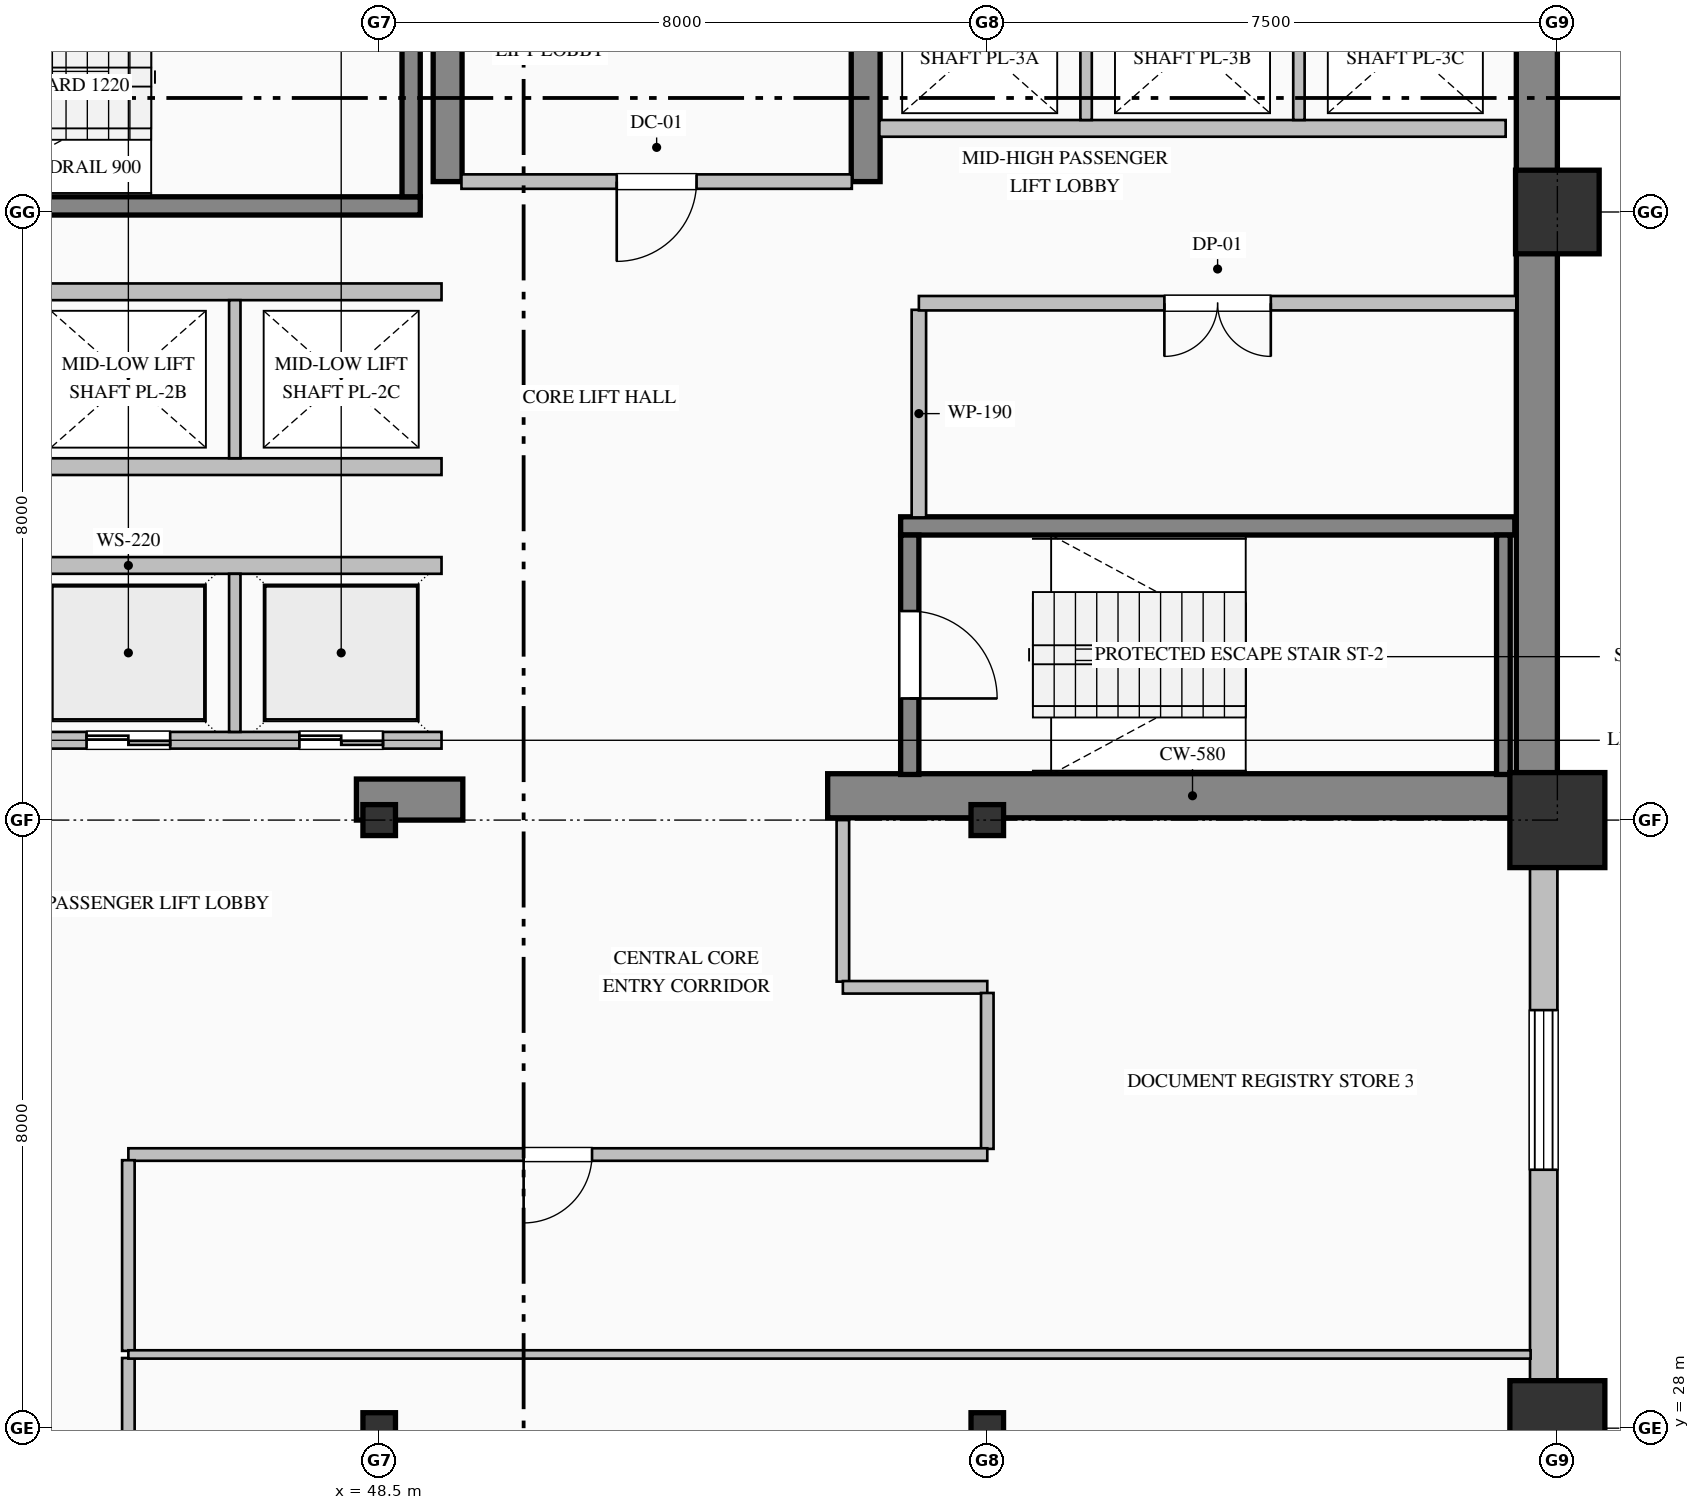
"""IFC4 building model, lengths in metres.
Left out: names, types, materials, properties, quantities, classifications, styles, units other than length and angle.
Written with IfcOpenShell. Run it as: python <this file> out.ifc"""

import sys

from ifc_helpers import new_model, si_unit, direction, frame, frame_2d, origin, origin_2d, place, context, subcontext, project, spatial, rectangle, hollow_rectangle, i_section, extrude, element, fill, save


model = new_model("IFC4")
c1 = context("Model", 3, precision=1e-05, world=origin(), true_north=direction((0.0, 1.0)))
c2 = subcontext(c1, "Body", "Model", "MODEL_VIEW")
j1 = project(units=[si_unit("LENGTHUNIT", "METRE"), si_unit("PLANEANGLEUNIT", "RADIAN")], contexts=[c1])
p1 = place(None, origin())
s1 = spatial("IfcSite", under=j1, at=p1, CompositionType="ELEMENT")
p2 = place(p1, origin())
s2 = spatial("IfcBuilding", under=s1, at=p2, CompositionType="ELEMENT")
p3 = place(p2, frame((0.0, 0.0, 104.2)))
s3 = spatial("IfcBuildingStorey", under=s2, at=p3, CompositionType="ELEMENT", Elevation=104.2)
p4 = place(p3, frame((63.73, 36.32, 0.0), z_axis=(0.0, 0.0, 1.0), x_axis=(0.0, 1.0, 0.0)))
e1 = element("IfcWall", 1, at=p4, inside=s3, PredefinedType="SHEAR", context=c2, shape_type="SweptSolid", body=[
    extrude(rectangle(XDim=15.14, YDim=0.54, at=frame_2d((7.57, 0.0))), origin(), (0.0, 0.0, 1.0), 3.65),
])
p5 = place(p3, frame((48.2, 36.27, 0.0), z_axis=(0.0, 0.0, 1.0), x_axis=(1.0, 0.0, 0.0)))
e2 = element("IfcWall", 2, at=p5, inside=s3, PredefinedType="SHEAR", context=c2, shape_type="SweptSolid", body=[
    extrude(rectangle(XDim=1.4, YDim=0.54, at=frame_2d((0.7, 0.0))), origin(), (0.0, 0.0, 1.0), 3.65),
])
p6 = place(p3, frame((54.4, 36.32, 0.0), z_axis=(0.0, 0.0, 1.0), x_axis=(1.0, 0.0, 0.0)))
e3 = element("IfcWall", 3, at=p6, inside=s3, PredefinedType="SHEAR", context=c2, shape_type="SweptSolid", body=[
    extrude(rectangle(XDim=9.6, YDim=0.58, at=frame_2d((4.8, 0.0))), origin(), (0.0, 0.0, 1.0), 4.0),
])
p7 = place(p3, frame((49.4, 44.4, 0.0), z_axis=(0.0, 0.0, 1.0), x_axis=(0.0, 1.0, 0.0)))
e4 = element("IfcWall", 4, at=p7, inside=s3, PredefinedType="SHEAR", context=c2, shape_type="SweptSolid", body=[
    extrude(rectangle(XDim=3.0, YDim=0.38, at=frame_2d((1.5, 0.0))), origin(), (0.0, 0.0, 1.0), 3.65),
])
p8 = place(p3, frame((54.9, 44.4, 0.0), z_axis=(0.0, 0.0, 1.0), x_axis=(0.0, 1.0, 0.0)))
e5 = element("IfcWall", 5, at=p8, inside=s3, PredefinedType="SHEAR", context=c2, shape_type="SweptSolid", body=[
    extrude(rectangle(XDim=7.06, YDim=0.38, at=frame_2d((3.53, 0.0))), origin(), (0.0, 0.0, 1.0), 3.65),
])
for number, where, z_axis, x_axis in (
    (6, (48.5, 28.0, 0.0), (0.0, 0.0, 1.0), (1.0, 0.0, 0.0)),
    (7, (48.5, 36.0, 0.0), (0.0, 0.0, 1.0), (1.0, 0.0, 0.0)),
    (8, (56.5, 28.0, 0.0), (0.0, 0.0, 1.0), (1.0, 0.0, 0.0)),
    (9, (56.5, 36.0, 0.0), (0.0, 0.0, 1.0), (1.0, 0.0, 0.0)),
):
    element("IfcColumn", number, at=place(p3, frame(where, z_axis=z_axis, x_axis=x_axis)), inside=s3, PredefinedType="COLUMN", context=c2, shape_type="SweptSolid", body=[
        extrude(i_section(OverallWidth=0.407, OverallDepth=0.428, WebThickness=0.02, FlangeThickness=0.035, FilletRadius=0.022, at=origin_2d()), origin(), (0.0, 0.0, 1.0), 4.0),
    ])
for number, where, z_axis, x_axis in (
    (10, (64.0, 28.0, 0.0), (0.0, 0.0, 1.0), (1.0, 0.0, 0.0)),
    (11, (64.0, 36.0, 0.0), (0.0, 0.0, 1.0), (1.0, 0.0, 0.0)),
):
    element("IfcColumn", number, at=place(p3, frame(where, z_axis=z_axis, x_axis=x_axis)), inside=s3, PredefinedType="COLUMN", context=c2, shape_type="SweptSolid", body=[
        extrude(hollow_rectangle(XDim=1.25, YDim=1.25, WallThickness=0.045, at=origin_2d()), origin(), (0.0, 0.0, 1.0), 4.0),
    ])
p9 = place(p3, frame((64.0, 44.0, 0.0), z_axis=(0.0, 0.0, 1.0), x_axis=(1.0, 0.0, 0.0)))
e12 = element("IfcColumn", 12, at=p9, inside=s3, PredefinedType="COLUMN", context=c2, shape_type="SweptSolid", body=[
    extrude(hollow_rectangle(XDim=1.1, YDim=1.1, WallThickness=0.04, at=origin_2d()), origin(), (0.0, 0.0, 1.0), 4.0),
])
p10 = place(p3, frame((63.82, 36.05, 0.0), z_axis=(0.0, 0.0, 1.0), x_axis=(0.0, -1.0, 0.0)))
e13 = element("IfcWall", 13, at=p10, inside=s3, PredefinedType="SOLIDWALL", context=c2, shape_type="SweptSolid", body=[
    extrude(rectangle(XDim=28.05, YDim=0.36, at=frame_2d((14.025, 0.0))), origin(), (0.0, 0.0, 1.0), 3.15),
])
p11 = place(p10, frame((2.55, 0.0, 0.85)))
e14 = element("IfcOpeningElement", 14, at=p11, cuts=e13, PredefinedType="OPENING", context=c2, shape_type="SweptSolid", body=[
    extrude(rectangle(XDim=2.1, YDim=2.05, at=frame_2d((1.05, 1.025))), frame((0.0, 0.19, 0.0), z_axis=(0.0, -1.0, 0.0), x_axis=(1.0, 0.0, 0.0)), (0.0, 0.0, 1.0), 0.38),
])
p12 = place(p10, frame((9.9, 0.0, 0.85)))
e15 = element("IfcOpeningElement", 15, at=p12, cuts=e13, PredefinedType="OPENING", context=c2, shape_type="SweptSolid", body=[
    extrude(rectangle(XDim=1.8, YDim=2.05, at=frame_2d((0.9, 1.025))), frame((0.0, 0.19, 0.0), z_axis=(0.0, -1.0, 0.0), x_axis=(1.0, 0.0, 0.0)), (0.0, 0.0, 1.0), 0.38),
])
p13 = place(p3, frame((49.04, 44.08, 0.0), z_axis=(0.0, 0.0, 1.0), x_axis=(-1.0, 0.0, 0.0)))
e16 = element("IfcWall", 16, at=p13, inside=s3, PredefinedType="SOLIDWALL", context=c2, shape_type="SweptSolid", body=[
    extrude(rectangle(XDim=8.08, YDim=0.24, at=frame_2d((4.04, 0.0))), origin(), (0.0, 0.0, 1.0), 4.0),
])
p14 = place(p3, frame((48.92, 44.2, 0.0), z_axis=(0.0, 0.0, 1.0), x_axis=(0.0, 1.0, 0.0)))
e17 = element("IfcWall", 17, at=p14, inside=s3, PredefinedType="SOLIDWALL", context=c2, shape_type="SweptSolid", body=[
    extrude(rectangle(XDim=3.15, YDim=0.24, at=frame_2d((1.575, 0.0))), origin(), (0.0, 0.0, 1.0), 4.0),
])
p15 = place(p3, frame((55.36, 39.87, 0.0), z_axis=(0.0, 0.0, 1.0), x_axis=(1.0, 0.0, 0.0)))
e18 = element("IfcWall", 18, at=p15, inside=s3, PredefinedType="SOLIDWALL", context=c2, shape_type="SweptSolid", body=[
    extrude(rectangle(XDim=8.08, YDim=0.24, at=frame_2d((4.04, 0.0))), origin(), (0.0, 0.0, 1.0), 4.0),
])
p16 = place(p3, frame((55.48, 39.75, 0.0), z_axis=(0.0, 0.0, 1.0), x_axis=(0.0, -1.0, 0.0)))
e19 = element("IfcWall", 19, at=p16, inside=s3, PredefinedType="SOLIDWALL", context=c2, shape_type="SweptSolid", body=[
    extrude(rectangle(XDim=3.15, YDim=0.24, at=frame_2d((1.575, 0.0))), origin(), (0.0, 0.0, 1.0), 4.0),
])
p17 = place(p16, frame((1.0, 0.0, 0.0)))
e20 = element("IfcOpeningElement", 20, at=p17, cuts=e19, PredefinedType="OPENING", context=c2, shape_type="SweptSolid", body=[
    extrude(rectangle(XDim=1.15, YDim=2.2, at=frame_2d((0.575, 1.1))), frame((0.0, 0.13, 0.0), z_axis=(0.0, -1.0, 0.0), x_axis=(1.0, 0.0, 0.0)), (0.0, 0.0, 1.0), 0.26),
])
p18 = place(p3, frame((63.29, 36.6, 0.0), z_axis=(0.0, 0.0, 1.0), x_axis=(0.0, 1.0, 0.0)))
e21 = element("IfcWall", 21, at=p18, inside=s3, PredefinedType="SOLIDWALL", context=c2, shape_type="SweptSolid", body=[
    extrude(rectangle(XDim=3.15, YDim=0.18, at=frame_2d((1.575, 0.0))), origin(), (0.0, 0.0, 1.0), 4.0),
])
p19 = place(p3, frame((49.32, 37.05, 0.0), z_axis=(0.0, 0.0, 1.0), x_axis=(-1.0, 0.0, 0.0)))
e22 = element("IfcWall", 22, at=p19, inside=s3, PredefinedType="PARTITIONING", context=c2, shape_type="SweptSolid", body=[
    extrude(rectangle(XDim=8.24, YDim=0.22, at=frame_2d((4.12, 0.0))), origin(), (0.0, 0.0, 1.0), 3.65),
])
p20 = place(p19, frame((6.37, 0.0, 0.0)))
e23 = element("IfcOpeningElement", 23, at=p20, cuts=e22, PredefinedType="OPENING", context=c2, shape_type="SweptSolid", body=[
    extrude(rectangle(XDim=1.1, YDim=2.2, at=frame_2d((0.55, 1.1))), frame((0.0, 0.12, 0.0), z_axis=(0.0, -1.0, 0.0), x_axis=(1.0, 0.0, 0.0)), (0.0, 0.0, 1.0), 0.24),
])
p21 = place(p19, frame((3.57, 0.0, 0.0)))
e24 = element("IfcOpeningElement", 24, at=p21, cuts=e22, PredefinedType="OPENING", context=c2, shape_type="SweptSolid", body=[
    extrude(rectangle(XDim=1.1, YDim=2.2, at=frame_2d((0.55, 1.1))), frame((0.0, 0.12, 0.0), z_axis=(0.0, -1.0, 0.0), x_axis=(1.0, 0.0, 0.0)), (0.0, 0.0, 1.0), 0.24),
])
p22 = place(p19, frame((0.77, 0.0, 0.0)))
e25 = element("IfcOpeningElement", 25, at=p22, cuts=e22, PredefinedType="OPENING", context=c2, shape_type="SweptSolid", body=[
    extrude(rectangle(XDim=1.1, YDim=2.2, at=frame_2d((0.55, 1.1))), frame((0.0, 0.12, 0.0), z_axis=(0.0, -1.0, 0.0), x_axis=(1.0, 0.0, 0.0)), (0.0, 0.0, 1.0), 0.24),
])
p23 = place(p3, frame((41.08, 39.35, 0.0), z_axis=(0.0, 0.0, 1.0), x_axis=(1.0, 0.0, 0.0)))
e26 = element("IfcWall", 26, at=p23, inside=s3, PredefinedType="PARTITIONING", context=c2, shape_type="SweptSolid", body=[
    extrude(rectangle(XDim=8.24, YDim=0.22, at=frame_2d((4.12, 0.0))), origin(), (0.0, 0.0, 1.0), 3.65),
])
p24 = place(p3, frame((46.6, 37.16, 0.0), z_axis=(0.0, 0.0, 1.0), x_axis=(0.0, 1.0, 0.0)))
e27 = element("IfcWall", 27, at=p24, inside=s3, PredefinedType="PARTITIONING", context=c2, shape_type="SweptSolid", body=[
    extrude(rectangle(XDim=2.08, YDim=0.15, at=frame_2d((1.04, 0.0))), origin(), (0.0, 0.0, 1.0), 3.65),
])
for number, where, z_axis, x_axis in (
    (28, (49.32, 40.65, 0.0), (0.0, 0.0, 1.0), (-1.0, 0.0, 0.0)),
    (29, (41.08, 42.95, 0.0), (0.0, 0.0, 1.0), (1.0, 0.0, 0.0)),
):
    element("IfcWall", number, at=place(p3, frame(where, z_axis=z_axis, x_axis=x_axis)), inside=s3, PredefinedType="PARTITIONING", context=c2, shape_type="SweptSolid", body=[
        extrude(rectangle(XDim=8.24, YDim=0.22, at=frame_2d((4.12, 0.0))), origin(), (0.0, 0.0, 1.0), 3.65),
    ])
p25 = place(p3, frame((46.6, 40.76, 0.0), z_axis=(0.0, 0.0, 1.0), x_axis=(0.0, 1.0, 0.0)))
e30 = element("IfcWall", 30, at=p25, inside=s3, PredefinedType="PARTITIONING", context=c2, shape_type="SweptSolid", body=[
    extrude(rectangle(XDim=2.08, YDim=0.15, at=frame_2d((1.04, 0.0))), origin(), (0.0, 0.0, 1.0), 3.65),
])
p26 = place(p3, frame((63.32, 45.1, 0.0), z_axis=(0.0, 0.0, 1.0), x_axis=(-1.0, 0.0, 0.0)))
e31 = element("IfcWall", 31, at=p26, inside=s3, PredefinedType="PARTITIONING", context=c2, shape_type="SweptSolid", body=[
    extrude(rectangle(XDim=8.24, YDim=0.22, at=frame_2d((4.12, 0.0))), origin(), (0.0, 0.0, 1.0), 3.65),
])
for number, where, z_axis, x_axis in (
    (32, (57.8, 45.21, 0.0), (0.0, 0.0, 1.0), (0.0, 1.0, 0.0)),
    (33, (60.6, 45.21, 0.0), (0.0, 0.0, 1.0), (0.0, 1.0, 0.0)),
):
    element("IfcWall", number, at=place(p3, frame(where, z_axis=z_axis, x_axis=x_axis)), inside=s3, PredefinedType="PARTITIONING", context=c2, shape_type="SweptSolid", body=[
        extrude(rectangle(XDim=2.03, YDim=0.15, at=frame_2d((1.015, 0.0))), origin(), (0.0, 0.0, 1.0), 3.65),
    ])
p27 = place(p3, frame((54.718, 44.4, 0.0), z_axis=(0.0, 0.0, 1.0), x_axis=(-1.0, 0.0, 0.0)))
e34 = element("IfcWall", 34, at=p27, inside=s3, PredefinedType="PARTITIONING", context=c2, shape_type="SweptSolid", body=[
    extrude(rectangle(XDim=5.136, YDim=0.19, at=frame_2d((2.568, 0.0))), origin(), (0.0, 0.0, 1.0), 3.65),
])
p28 = place(p27, frame((2.043, 0.0, 0.0)))
e35 = element("IfcOpeningElement", 35, at=p28, cuts=e34, PredefinedType="OPENING", context=c2, shape_type="SweptSolid", body=[
    extrude(rectangle(XDim=1.05, YDim=2.15, at=frame_2d((0.525, 1.075))), frame((0.0, 0.105, 0.0), z_axis=(0.0, -1.0, 0.0), x_axis=(1.0, 0.0, 0.0)), (0.0, 0.0, 1.0), 0.21),
])
p29 = place(p3, frame((55.6, 42.713, 0.0), z_axis=(0.0, 0.0, 1.0), x_axis=(0.0, -1.0, 0.0)))
e36 = element("IfcWall", 36, at=p29, inside=s3, PredefinedType="PARTITIONING", context=c2, shape_type="SweptSolid", body=[
    extrude(rectangle(XDim=2.731, YDim=0.19, at=frame_2d((1.365, 0.0))), origin(), (0.0, 0.0, 1.0), 3.65),
])
p30 = place(p3, frame((63.46, 42.8, 0.0), z_axis=(0.0, 0.0, 1.0), x_axis=(-1.0, 0.0, 0.0)))
e37 = element("IfcWall", 37, at=p30, inside=s3, PredefinedType="PARTITIONING", context=c2, shape_type="SweptSolid", body=[
    extrude(rectangle(XDim=7.86, YDim=0.19, at=frame_2d((3.93, 0.0))), origin(), (0.0, 0.0, 1.0), 3.65),
])
p31 = place(p30, frame((3.23, 0.0, 0.0)))
e38 = element("IfcOpeningElement", 38, at=p31, cuts=e37, PredefinedType="OPENING", context=c2, shape_type="SweptSolid", body=[
    extrude(rectangle(XDim=1.4, YDim=2.25, at=frame_2d((0.7, 1.125))), frame((0.0, 0.105, 0.0), z_axis=(0.0, -1.0, 0.0), x_axis=(1.0, 0.0, 0.0)), (0.0, 0.0, 1.0), 0.21),
])
p32 = place(p3, frame((54.6, 36.0, 0.0), z_axis=(0.0, 0.0, 1.0), x_axis=(0.0, -1.0, 0.0)))
e39 = element("IfcWall", 39, at=p32, inside=s3, PredefinedType="PARTITIONING", context=c2, shape_type="SweptSolid", body=[
    extrude(rectangle(XDim=2.125, YDim=0.165, at=frame_2d((1.063, 0.0))), origin(), (0.0, 0.0, 1.0), 3.65),
])
p33 = place(p3, frame((54.6, 33.8, 0.0), z_axis=(0.0, 0.0, 1.0), x_axis=(1.0, 0.0, 0.0)))
e40 = element("IfcWall", 40, at=p33, inside=s3, PredefinedType="PARTITIONING", context=c2, shape_type="SweptSolid", body=[
    extrude(rectangle(XDim=1.9, YDim=0.165, at=frame_2d((0.95, 0.0))), origin(), (0.0, 0.0, 1.0), 3.65),
])
p34 = place(p3, frame((56.5, 33.726, 0.0), z_axis=(0.0, 0.0, 1.0), x_axis=(0.0, -1.0, 0.0)))
e41 = element("IfcWall", 41, at=p34, inside=s3, PredefinedType="PARTITIONING", context=c2, shape_type="SweptSolid", body=[
    extrude(rectangle(XDim=2.051, YDim=0.165, at=frame_2d((1.025, 0.0))), origin(), (0.0, 0.0, 1.0), 2.942),
])
p35 = place(p3, frame((56.5, 31.6, 0.0), z_axis=(0.0, 0.0, 1.0), x_axis=(-1.0, 0.0, 0.0)))
e42 = element("IfcWall", 42, at=p35, inside=s3, PredefinedType="PARTITIONING", context=c2, shape_type="SweptSolid", body=[
    extrude(rectangle(XDim=11.3, YDim=0.165, at=frame_2d((5.65, 0.0))), origin(), (0.0, 0.0, 1.0), 3.65),
])
p36 = place(p35, frame((5.2, 0.0, 0.0)))
e43 = element("IfcOpeningElement", 43, at=p36, cuts=e42, PredefinedType="OPENING", context=c2, shape_type="SweptSolid", body=[
    extrude(rectangle(XDim=0.9, YDim=2.15, at=frame_2d((0.45, 1.075))), frame((0.0, 0.093, 0.0), z_axis=(0.0, -1.0, 0.0), x_axis=(1.0, 0.0, 0.0)), (0.0, 0.0, 1.0), 0.185),
])
p37 = place(p3, frame((45.2, 28.923, 0.0), z_axis=(0.0, 0.0, 1.0), x_axis=(0.0, -1.0, 0.0)))
e44 = element("IfcWall", 44, at=p37, inside=s3, PredefinedType="PARTITIONING", context=c2, shape_type="SweptSolid", body=[
    extrude(rectangle(XDim=6.936, YDim=0.165, at=frame_2d((3.468, 0.0))), origin(), (0.0, 0.0, 1.0), 3.65),
])
p38 = place(p37, frame((3.018, 0.0, 0.0)))
e45 = element("IfcOpeningElement", 45, at=p38, cuts=e44, PredefinedType="OPENING", context=c2, shape_type="SweptSolid", body=[
    extrude(rectangle(XDim=0.9, YDim=2.15, at=frame_2d((0.45, 1.075))), frame((0.0, 0.093, 0.0), z_axis=(0.0, -1.0, 0.0), x_axis=(1.0, 0.0, 0.0)), (0.0, 0.0, 1.0), 0.185),
])
p39 = place(p3, frame((45.2, 31.525, 0.0), z_axis=(0.0, 0.0, 1.0), x_axis=(0.0, -1.0, 0.0)))
e46 = element("IfcWall", 46, at=p39, inside=s3, PredefinedType="PARTITIONING", context=c2, shape_type="SweptSolid", body=[
    extrude(rectangle(XDim=2.508, YDim=0.165, at=frame_2d((1.254, 0.0))), origin(), (0.0, 0.0, 1.0), 3.65),
])
p40 = place(p3, frame((45.2, 28.97, 0.0), z_axis=(0.0, 0.0, 1.0), x_axis=(1.0, 0.0, 0.0)))
e47 = element("IfcWall", 47, at=p40, inside=s3, PredefinedType="MOVABLE", context=c2, shape_type="SweptSolid", body=[
    extrude(rectangle(XDim=18.448, YDim=0.11, at=frame_2d((9.224, 0.0))), origin(), (0.0, 0.0, 1.0), 3.65),
])
p41 = place(p11, origin())
e48 = element("IfcWindow", 48, at=p41, inside=s3, PartitioningType="TRIPLE_PANEL_VERTICAL", PredefinedType="WINDOW", context=c2, shape_type="SweptSolid", body=[
    extrude(rectangle(XDim=2.1, YDim=2.05, at=frame_2d((1.05, 1.025))), frame((0.0, 0.15, 0.0), z_axis=(0.0, -1.0, 0.0), x_axis=(1.0, 0.0, 0.0)), (0.0, 0.0, 1.0), 0.06),
])
fill(e14, e48)
p42 = place(p17, origin())
e49 = element("IfcDoor", 49, at=p42, inside=s3, OperationType="SINGLE_SWING_RIGHT", PredefinedType="DOOR", context=c2, shape_type="SweptSolid", body=[
    extrude(rectangle(XDim=1.15, YDim=2.2, at=frame_2d((0.575, 1.1))), frame((0.0, 0.025, 0.0), z_axis=(0.0, -1.0, 0.0), x_axis=(1.0, 0.0, 0.0)), (0.0, 0.0, 1.0), 0.05),
])
fill(e20, e49)
p43 = place(p21, origin())
e50 = element("IfcDoor", 50, at=p43, inside=s3, OperationType="DOUBLE_DOOR_SLIDING", PredefinedType="DOOR", context=c2, shape_type="SweptSolid", body=[
    extrude(rectangle(XDim=1.1, YDim=2.2, at=frame_2d((0.55, 1.1))), frame((0.0, 0.025, 0.0), z_axis=(0.0, -1.0, 0.0), x_axis=(1.0, 0.0, 0.0)), (0.0, 0.0, 1.0), 0.05),
])
fill(e24, e50)
p44 = place(p22, origin())
e51 = element("IfcDoor", 51, at=p44, inside=s3, OperationType="DOUBLE_DOOR_SLIDING", PredefinedType="DOOR", context=c2, shape_type="SweptSolid", body=[
    extrude(rectangle(XDim=1.1, YDim=2.2, at=frame_2d((0.55, 1.1))), frame((0.0, 0.025, 0.0), z_axis=(0.0, -1.0, 0.0), x_axis=(1.0, 0.0, 0.0)), (0.0, 0.0, 1.0), 0.05),
])
fill(e25, e51)
p45 = place(p28, origin())
e52 = element("IfcDoor", 52, at=p45, inside=s3, OperationType="SINGLE_SWING_RIGHT", PredefinedType="DOOR", context=c2, shape_type="SweptSolid", body=[
    extrude(rectangle(XDim=1.05, YDim=2.15, at=frame_2d((0.525, 1.075))), frame((0.0, 0.025, 0.0), z_axis=(0.0, -1.0, 0.0), x_axis=(1.0, 0.0, 0.0)), (0.0, 0.0, 1.0), 0.05),
])
fill(e35, e52)
p46 = place(p31, origin())
e53 = element("IfcDoor", 53, at=p46, inside=s3, OperationType="DOUBLE_DOOR_SINGLE_SWING", PredefinedType="DOOR", context=c2, shape_type="SweptSolid", body=[
    extrude(rectangle(XDim=1.4, YDim=2.25, at=frame_2d((0.7, 1.125))), frame((0.0, 0.025, 0.0), z_axis=(0.0, -1.0, 0.0), x_axis=(1.0, 0.0, 0.0)), (0.0, 0.0, 1.0), 0.05),
])
fill(e38, e53)
p47 = place(p36, origin())
e54 = element("IfcDoor", 54, at=p47, inside=s3, OperationType="SINGLE_SWING_RIGHT", PredefinedType="DOOR", context=c2, shape_type="SweptSolid", body=[
    extrude(rectangle(XDim=0.9, YDim=2.15, at=frame_2d((0.45, 1.075))), frame((0.0, 0.025, 0.0), z_axis=(0.0, -1.0, 0.0), x_axis=(1.0, 0.0, 0.0)), (0.0, 0.0, 1.0), 0.05),
])
fill(e43, e54)
save(model, sys.argv[1])
